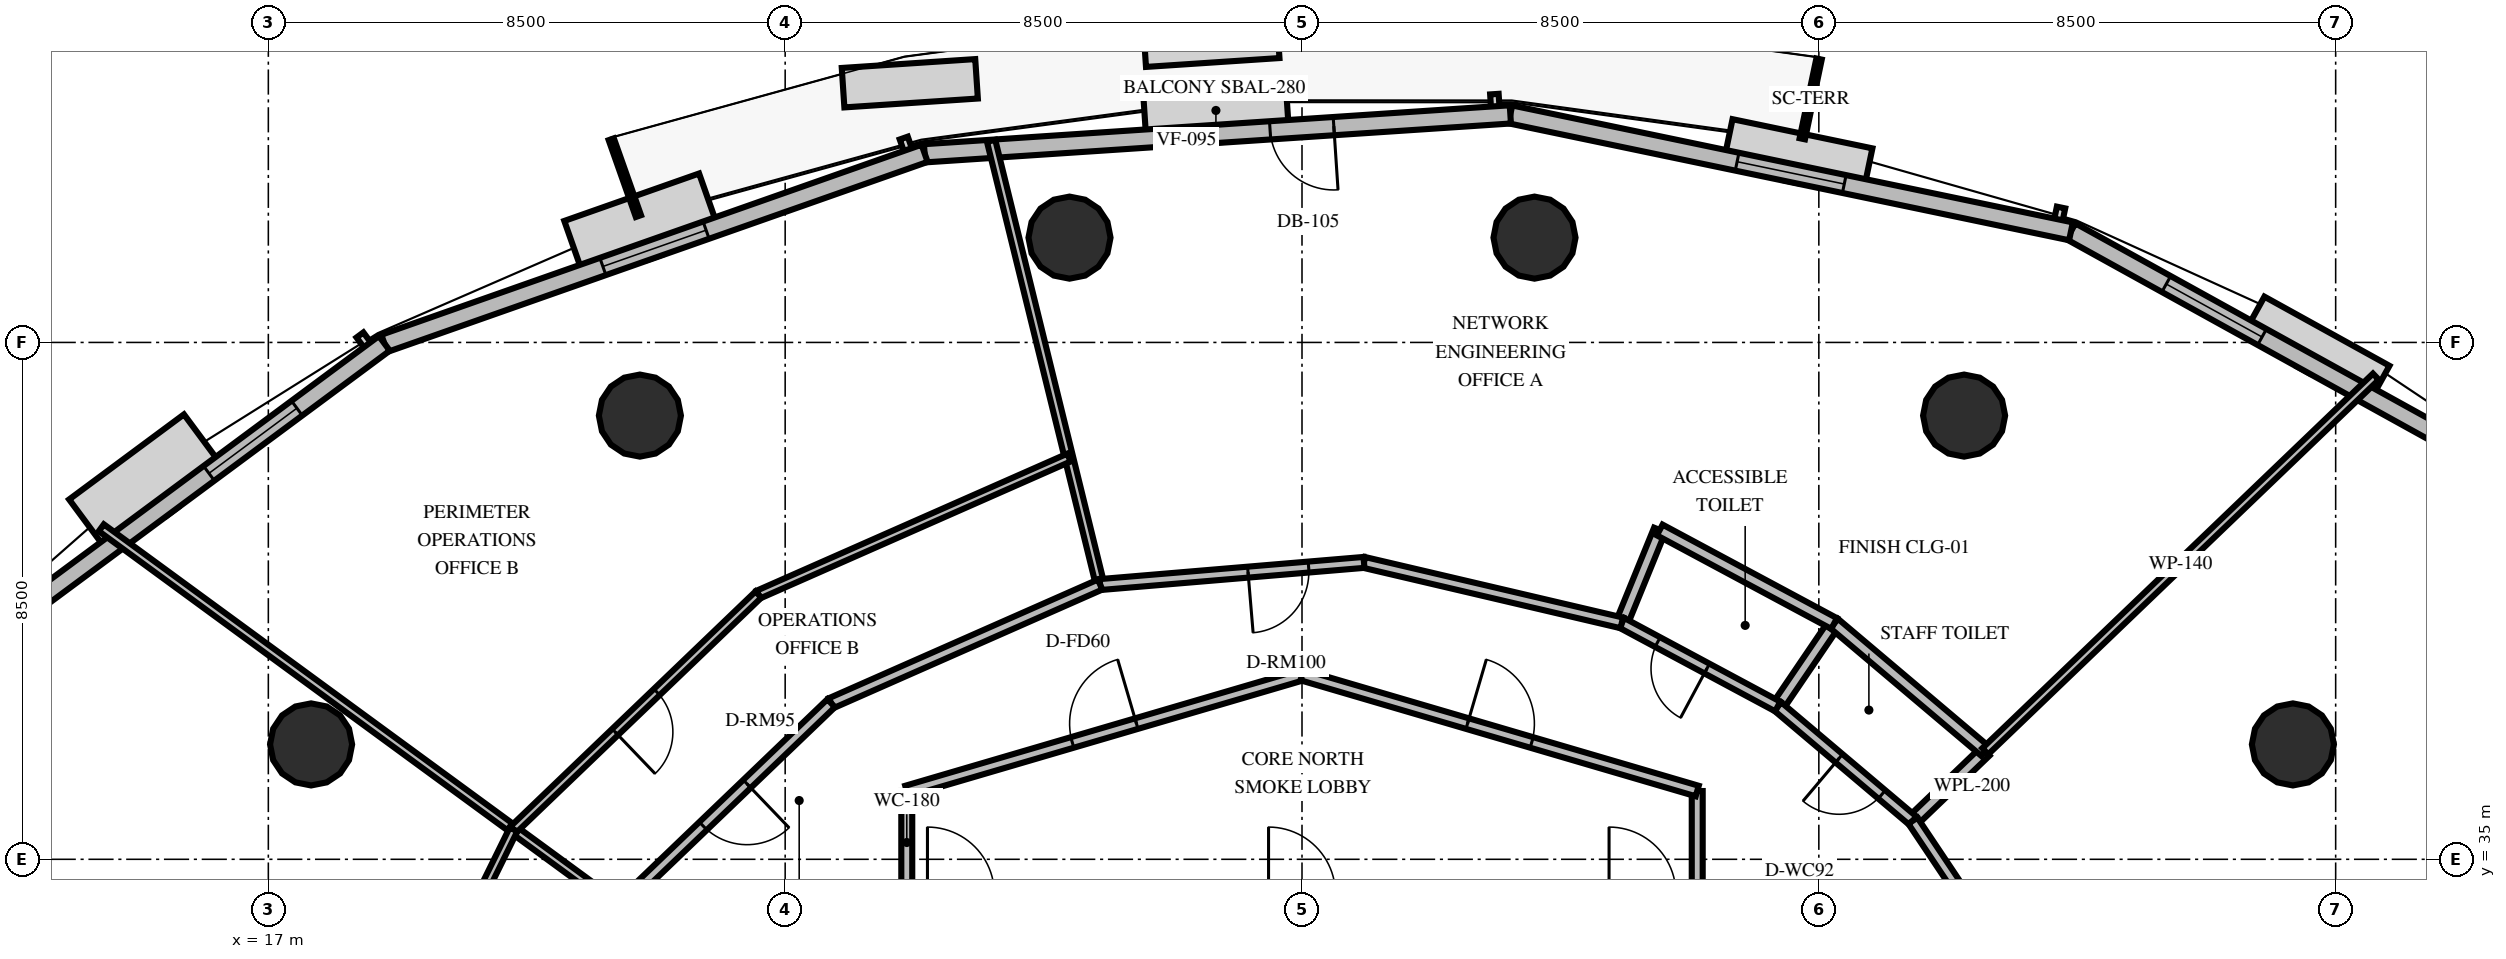
"""IFC4 building model, lengths in metres.
Left out: names, types, materials, properties, quantities, classifications, styles, units other than length and angle.
Written with IfcOpenShell. Run it as: python <this file> out.ifc"""

import sys

from ifc_helpers import new_model, si_unit, direction, frame, frame_2d, origin, origin_2d, place, context, subcontext, project, spatial, rectangle, circle, extrude, element, fill, save


model = new_model("IFC4")
c1 = context("Model", 3, precision=1e-05, world=origin(), true_north=direction((0.0, 1.0)))
c2 = subcontext(c1, "Body", "Model", "MODEL_VIEW")
j1 = project(units=[si_unit("LENGTHUNIT", "METRE"), si_unit("PLANEANGLEUNIT", "RADIAN")], contexts=[c1])
p1 = place(None, origin())
s1 = spatial("IfcSite", under=j1, at=p1, CompositionType="ELEMENT")
p2 = place(p1, origin())
s2 = spatial("IfcBuilding", under=s1, at=p2, CompositionType="ELEMENT")
p3 = place(p2, frame((0.0, 0.0, 46.8)))
s3 = spatial("IfcBuildingStorey", under=s2, at=p3, CompositionType="ELEMENT", Elevation=46.8)
for number, where, z_axis, x_axis in (
    (1, (50.297, 36.889, 0.0), (0.0, 0.0, 1.0), (1.0, 0.0, 0.0)),
    (2, (44.889, 42.297, 0.0), (0.0, 0.0, 1.0), (1.0, 0.0, 0.0)),
    (3, (37.824, 45.223, 0.0), (0.0, 0.0, 1.0), (1.0, 0.0, 0.0)),
    (4, (30.176, 45.223, 0.0), (0.0, 0.0, 1.0), (1.0, 0.0, 0.0)),
    (5, (23.111, 42.297, 0.0), (0.0, 0.0, 1.0), (1.0, 0.0, 0.0)),
    (6, (17.703, 36.889, 0.0), (0.0, 0.0, 1.0), (1.0, 0.0, 0.0)),
):
    element("IfcColumn", number, at=place(p3, frame(where, z_axis=z_axis, x_axis=x_axis)), inside=s3, PredefinedType="COLUMN", context=c2, shape_type="SweptSolid", body=[
        extrude(circle(Radius=0.675, at=origin_2d()), origin(), (0.0, 0.0, 1.0), 4.2),
    ])
p4 = place(p3, frame((54.342, 41.073, 0.0), z_axis=(0.0, 0.0, 1.0), x_axis=(-0.875145624266, 0.48385962461, 0.0)))
e7 = element("IfcWall", 7, at=p4, inside=s3, PredefinedType="SOLIDWALL", context=c2, shape_type="SweptSolid", body=[
    extrude(rectangle(XDim=8.793, YDim=0.3, at=frame_2d((4.396, 0.0))), origin(), (0.0, 0.0, 1.0), 3.0),
])
p5 = place(p4, frame((5.202, 0.0, 0.8)))
e8 = element("IfcOpeningElement", 8, at=p5, cuts=e7, PredefinedType="OPENING", context=c2, shape_type="SweptSolid", body=[
    extrude(rectangle(XDim=1.8, YDim=1.95, at=frame_2d((0.9, 0.975))), frame((0.0, 0.16, 0.0), z_axis=(0.0, -1.0, 0.0), x_axis=(1.0, 0.0, 0.0)), (0.0, 0.0, 1.0), 0.32),
])
p6 = place(p3, frame((46.647, 45.327, 0.0), z_axis=(0.0, 0.0, 1.0), x_axis=(-0.978929281729, 0.20419956262, 0.0)))
e9 = element("IfcWall", 9, at=p6, inside=s3, PredefinedType="SOLIDWALL", context=c2, shape_type="SweptSolid", body=[
    extrude(rectangle(XDim=9.419, YDim=0.3, at=frame_2d((4.709, 0.0))), origin(), (0.0, 0.0, 1.0), 3.0),
])
p7 = place(p6, frame((3.809, 0.0, 0.8)))
e10 = element("IfcOpeningElement", 10, at=p7, cuts=e9, PredefinedType="OPENING", context=c2, shape_type="SweptSolid", body=[
    extrude(rectangle(XDim=1.8, YDim=1.95, at=frame_2d((0.9, 0.975))), frame((0.0, 0.16, 0.0), z_axis=(0.0, -1.0, 0.0), x_axis=(1.0, 0.0, 0.0)), (0.0, 0.0, 1.0), 0.32),
])
p8 = place(p3, frame((37.427, 47.25, 0.0), z_axis=(0.0, 0.0, 1.0), x_axis=(-0.997801240682, -0.066277327145, 0.0)))
e11 = element("IfcWall", 11, at=p8, inside=s3, PredefinedType="SOLIDWALL", context=c2, shape_type="SweptSolid", body=[
    extrude(rectangle(XDim=9.655, YDim=0.3, at=frame_2d((4.827, 0.0))), origin(), (0.0, 0.0, 1.0), 3.0),
])
p9 = place(p8, frame((2.91, 0.0, 0.0)))
e12 = element("IfcOpeningElement", 12, at=p9, cuts=e11, PredefinedType="OPENING", context=c2, shape_type="SweptSolid", body=[
    extrude(rectangle(XDim=1.05, YDim=2.15, at=frame_2d((0.525, 1.075))), frame((0.0, 0.16, 0.0), z_axis=(0.0, -1.0, 0.0), x_axis=(1.0, 0.0, 0.0)), (0.0, 0.0, 1.0), 0.32),
])
p10 = place(p3, frame((27.793, 46.61, 0.0), z_axis=(0.0, 0.0, 1.0), x_axis=(-0.943328169931, -0.33186136234, 0.0)))
e13 = element("IfcWall", 13, at=p10, inside=s3, PredefinedType="SOLIDWALL", context=c2, shape_type="SweptSolid", body=[
    extrude(rectangle(XDim=9.419, YDim=0.3, at=frame_2d((4.709, 0.0))), origin(), (0.0, 0.0, 1.0), 3.0),
])
p11 = place(p10, frame((3.809, 0.0, 0.8)))
e14 = element("IfcOpeningElement", 14, at=p11, cuts=e13, PredefinedType="OPENING", context=c2, shape_type="SweptSolid", body=[
    extrude(rectangle(XDim=1.8, YDim=1.95, at=frame_2d((0.9, 0.975))), frame((0.0, 0.16, 0.0), z_axis=(0.0, -1.0, 0.0), x_axis=(1.0, 0.0, 0.0)), (0.0, 0.0, 1.0), 0.32),
])
p12 = place(p3, frame((18.908, 43.485, 0.0), z_axis=(0.0, 0.0, 1.0), x_axis=(-0.803465201032, -0.595351720187, 0.0)))
e15 = element("IfcWall", 15, at=p12, inside=s3, PredefinedType="SOLIDWALL", context=c2, shape_type="SweptSolid", body=[
    extrude(rectangle(XDim=8.792, YDim=0.3, at=frame_2d((4.396, 0.0))), origin(), (0.0, 0.0, 1.0), 3.0),
])
p13 = place(p12, frame((1.79, 0.0, 0.8)))
e16 = element("IfcOpeningElement", 16, at=p13, cuts=e15, PredefinedType="OPENING", context=c2, shape_type="SweptSolid", body=[
    extrude(rectangle(XDim=1.8, YDim=1.95, at=frame_2d((0.9, 0.975))), frame((0.0, 0.16, 0.0), z_axis=(0.0, -1.0, 0.0), x_axis=(1.0, 0.0, 0.0)), (0.0, 0.0, 1.0), 0.32),
])
for number, where, z_axis, x_axis in (
    (17, (27.5, 34.43, 0.0), (0.0, 0.0, 1.0), (0.0, 1.0, 0.0)),
    (18, (40.5, 36.123, 0.0), (0.0, 0.0, 1.0), (0.0, -1.0, 0.0)),
):
    element("IfcWall", number, at=place(p3, frame(where, z_axis=z_axis, x_axis=x_axis)), inside=s3, PredefinedType="PARTITIONING", context=c2, shape_type="SweptSolid", body=[
        extrude(rectangle(XDim=1.693, YDim=0.18, at=frame_2d((0.846, 0.0))), origin(), (0.0, 0.0, 1.0), 3.0),
    ])
p14 = place(p3, frame((27.5, 36.123, 0.0), z_axis=(0.0, 0.0, 1.0), x_axis=(0.959546654541, 0.281549671923, 0.0)))
e19 = element("IfcWall", 19, at=p14, inside=s3, PredefinedType="PARTITIONING", context=c2, shape_type="SweptSolid", body=[
    extrude(rectangle(XDim=6.774, YDim=0.18, at=frame_2d((3.387, 0.0))), origin(), (0.0, 0.0, 1.0), 3.0),
])
p15 = place(p14, frame((2.837, 0.0, 0.0)))
e20 = element("IfcOpeningElement", 20, at=p15, cuts=e19, PredefinedType="OPENING", context=c2, shape_type="SweptSolid", body=[
    extrude(rectangle(XDim=1.1, YDim=2.15, at=frame_2d((0.55, 1.075))), frame((0.0, 0.1, 0.0), z_axis=(0.0, -1.0, 0.0), x_axis=(1.0, 0.0, 0.0)), (0.0, 0.0, 1.0), 0.2),
])
p16 = place(p3, frame((34.0, 38.03, 0.0), z_axis=(0.0, 0.0, 1.0), x_axis=(0.959546654541, -0.281549671923, 0.0)))
e21 = element("IfcWall", 21, at=p16, inside=s3, PredefinedType="PARTITIONING", context=c2, shape_type="SweptSolid", body=[
    extrude(rectangle(XDim=6.774, YDim=0.18, at=frame_2d((3.387, 0.0))), origin(), (0.0, 0.0, 1.0), 3.0),
])
p17 = place(p16, frame((2.837, 0.0, 0.0)))
e22 = element("IfcOpeningElement", 22, at=p17, cuts=e21, PredefinedType="OPENING", context=c2, shape_type="SweptSolid", body=[
    extrude(rectangle(XDim=1.1, YDim=2.15, at=frame_2d((0.55, 1.075))), frame((0.0, 0.1, 0.0), z_axis=(0.0, -1.0, 0.0), x_axis=(1.0, 0.0, 0.0)), (0.0, 0.0, 1.0), 0.2),
])
for number, where, z_axis, x_axis in (
    (23, (44.047, 35.635, 0.0), (0.0, 0.0, 1.0), (0.722, 0.692, 0.0)),
    (24, (41.824, 37.513, 0.0), (0.0, 0.0, 1.0), (0.562, 0.827, 0.0)),
):
    element("IfcWall", number, at=place(p3, frame(where, z_axis=z_axis, x_axis=x_axis)), inside=s3, PredefinedType="PLUMBINGWALL", context=c2, shape_type="SweptSolid", body=[
        extrude(rectangle(XDim=1.65, YDim=0.2, at=frame_2d((0.825, 0.0))), origin(), (0.0, 0.0, 1.0), 3.0),
    ])
p18 = place(p3, frame((45.238, 36.777, 0.0), z_axis=(0.0, 0.0, 1.0), x_axis=(-0.76377022489, 0.645488221094, 0.0)))
e25 = element("IfcWall", 25, at=p18, inside=s3, PredefinedType="PLUMBINGWALL", context=c2, shape_type="SweptSolid", body=[
    extrude(rectangle(XDim=3.255, YDim=0.2, at=frame_2d((1.627, 0.0))), origin(), (0.0, 0.0, 1.0), 3.0),
])
p19 = place(p3, frame((44.047, 35.635, 0.0), z_axis=(0.0, 0.0, 1.0), x_axis=(-0.763774375934, 0.645483309363, 0.0)))
e26 = element("IfcWall", 26, at=p19, inside=s3, PredefinedType="PARTITIONING", context=c2, shape_type="SweptSolid", body=[
    extrude(rectangle(XDim=2.91, YDim=0.18, at=frame_2d((1.455, 0.0))), origin(), (0.0, 0.0, 1.0), 3.0),
])
p20 = place(p19, frame((0.669, 0.0, 0.0)))
e27 = element("IfcOpeningElement", 27, at=p20, cuts=e26, PredefinedType="OPENING", context=c2, shape_type="SweptSolid", body=[
    extrude(rectangle(XDim=0.92, YDim=2.1, at=frame_2d((0.46, 1.05))), frame((0.0, 0.1, 0.0), z_axis=(0.0, -1.0, 0.0), x_axis=(1.0, 0.0, 0.0)), (0.0, 0.0, 1.0), 0.2),
])
p21 = place(p3, frame((39.26, 38.888, 0.0), z_axis=(0.0, 0.0, 1.0), x_axis=(0.377912528559, 0.925841304305, 0.0)))
e28 = element("IfcWall", 28, at=p21, inside=s3, PredefinedType="PLUMBINGWALL", context=c2, shape_type="SweptSolid", body=[
    extrude(rectangle(XDim=1.65, YDim=0.2, at=frame_2d((0.825, 0.0))), origin(), (0.0, 0.0, 1.0), 3.0),
])
p22 = place(p3, frame((42.752, 38.878, 0.0), z_axis=(0.0, 0.0, 1.0), x_axis=(-0.881312658049, 0.47253359538, 0.0)))
e29 = element("IfcWall", 29, at=p22, inside=s3, PredefinedType="PLUMBINGWALL", context=c2, shape_type="SweptSolid", body=[
    extrude(rectangle(XDim=3.255, YDim=0.2, at=frame_2d((1.627, 0.0))), origin(), (0.0, 0.0, 1.0), 3.0),
])
p23 = place(p3, frame((41.824, 37.513, 0.0), z_axis=(0.0, 0.0, 1.0), x_axis=(-0.881294073776, 0.472568254887, 0.0)))
e30 = element("IfcWall", 30, at=p23, inside=s3, PredefinedType="PARTITIONING", context=c2, shape_type="SweptSolid", body=[
    extrude(rectangle(XDim=2.91, YDim=0.18, at=frame_2d((1.455, 0.0))), origin(), (0.0, 0.0, 1.0), 3.0),
])
p24 = place(p23, frame((1.321, 0.0, 0.0)))
e31 = element("IfcOpeningElement", 31, at=p24, cuts=e30, PredefinedType="OPENING", context=c2, shape_type="SweptSolid", body=[
    extrude(rectangle(XDim=0.92, YDim=2.1, at=frame_2d((0.46, 1.05))), frame((0.0, 0.1, 0.0), z_axis=(0.0, -1.0, 0.0), x_axis=(1.0, 0.0, 0.0)), (0.0, 0.0, 1.0), 0.2),
])
p25 = place(p3, frame((45.238, 36.777, 0.0), z_axis=(0.0, 0.0, 1.0), x_axis=(0.721750646937, 0.692153164874, 0.0)))
e32 = element("IfcWall", 32, at=p25, inside=s3, PredefinedType="PARTITIONING", context=c2, shape_type="SweptSolid", body=[
    extrude(rectangle(XDim=8.9, YDim=0.14, at=frame_2d((4.45, 0.0))), origin(), (0.0, 0.0, 1.0), 3.0),
])
p26 = place(p3, frame((30.68, 39.518, 0.0), z_axis=(0.0, 0.0, 1.0), x_axis=(-0.238558066821, 0.971128234969, 0.0)))
e33 = element("IfcWall", 33, at=p26, inside=s3, PredefinedType="PARTITIONING", context=c2, shape_type="SweptSolid", body=[
    extrude(rectangle(XDim=7.514, YDim=0.14, at=frame_2d((3.757, 0.0))), origin(), (0.0, 0.0, 1.0), 3.0),
])
p27 = place(p3, frame((39.26, 38.888, 0.0), z_axis=(0.0, 0.0, 1.0), x_axis=(-0.973583801544, 0.228329983514, 0.0)))
e34 = element("IfcWall", 34, at=p27, inside=s3, PredefinedType="PARTITIONING", context=c2, shape_type="SweptSolid", body=[
    extrude(rectangle(XDim=4.355, YDim=0.18, at=frame_2d((2.177, 0.0))), origin(), (0.0, 0.0, 1.0), 3.0),
])
p28 = place(p3, frame((35.02, 39.883, 0.0), z_axis=(0.0, 0.0, 1.0), x_axis=(-0.99649609518, -0.083639298718, 0.0)))
e35 = element("IfcWall", 35, at=p28, inside=s3, PredefinedType="PARTITIONING", context=c2, shape_type="SweptSolid", body=[
    extrude(rectangle(XDim=4.355, YDim=0.18, at=frame_2d((2.178, 0.0))), origin(), (0.0, 0.0, 1.0), 3.0),
])
p29 = place(p28, frame((0.914, 0.0, 0.0)))
e36 = element("IfcOpeningElement", 36, at=p29, cuts=e35, PredefinedType="OPENING", context=c2, shape_type="SweptSolid", body=[
    extrude(rectangle(XDim=1.0, YDim=2.15, at=frame_2d((0.5, 1.075))), frame((0.0, 0.1, 0.0), z_axis=(0.0, -1.0, 0.0), x_axis=(1.0, 0.0, 0.0)), (0.0, 0.0, 1.0), 0.2),
])
p30 = place(p3, frame((22.767, 34.221, 0.0), z_axis=(0.0, 0.0, 1.0), x_axis=(-0.806954200192, 0.590614018453, 0.0)))
e37 = element("IfcWall", 37, at=p30, inside=s3, PredefinedType="PARTITIONING", context=c2, shape_type="SweptSolid", body=[
    extrude(rectangle(XDim=10.55, YDim=0.14, at=frame_2d((5.275, 0.0))), origin(), (0.0, 0.0, 1.0), 3.0),
])
p31 = place(p3, frame((30.68, 39.518, 0.0), z_axis=(0.0, 0.0, 1.0), x_axis=(-0.914959483899, -0.403545713425, 0.0)))
e38 = element("IfcWall", 38, at=p31, inside=s3, PredefinedType="PARTITIONING", context=c2, shape_type="SweptSolid", body=[
    extrude(rectangle(XDim=4.834, YDim=0.18, at=frame_2d((2.417, 0.0))), origin(), (0.0, 0.0, 1.0), 3.0),
])
p32 = place(p3, frame((26.256, 37.567, 0.0), z_axis=(0.0, 0.0, 1.0), x_axis=(-0.721748503055, -0.692155400425, 0.0)))
e39 = element("IfcWall", 39, at=p32, inside=s3, PredefinedType="PARTITIONING", context=c2, shape_type="SweptSolid", body=[
    extrude(rectangle(XDim=4.834, YDim=0.18, at=frame_2d((2.417, 0.0))), origin(), (0.0, 0.0, 1.0), 3.0),
])
p33 = place(p32, frame((1.917, 0.0, 0.0)))
e40 = element("IfcOpeningElement", 40, at=p33, cuts=e39, PredefinedType="OPENING", context=c2, shape_type="SweptSolid", body=[
    extrude(rectangle(XDim=1.0, YDim=2.15, at=frame_2d((0.5, 1.075))), frame((0.0, 0.1, 0.0), z_axis=(0.0, -1.0, 0.0), x_axis=(1.0, 0.0, 0.0)), (0.0, 0.0, 1.0), 0.2),
])
p34 = place(p3, frame((30.167, 41.606, 0.0), z_axis=(0.0, 0.0, 1.0), x_axis=(-0.914960559012, -0.403543275812, 0.0)))
e41 = element("IfcWall", 41, at=p34, inside=s3, PredefinedType="PARTITIONING", context=c2, shape_type="SweptSolid", body=[
    extrude(rectangle(XDim=5.581, YDim=0.14, at=frame_2d((2.791, 0.0))), origin(), (0.0, 0.0, 1.0), 3.0),
])
p35 = place(p3, frame((25.06, 39.354, 0.0), z_axis=(0.0, 0.0, 1.0), x_axis=(-0.721758722744, -0.692144743636, 0.0)))
e42 = element("IfcWall", 42, at=p35, inside=s3, PredefinedType="PARTITIONING", context=c2, shape_type="SweptSolid", body=[
    extrude(rectangle(XDim=5.581, YDim=0.14, at=frame_2d((2.791, 0.0))), origin(), (0.0, 0.0, 1.0), 3.0),
])
p36 = place(p35, frame((2.315, 0.0, 0.0)))
e43 = element("IfcOpeningElement", 43, at=p36, cuts=e42, PredefinedType="OPENING", context=c2, shape_type="SweptSolid", body=[
    extrude(rectangle(XDim=0.95, YDim=2.15, at=frame_2d((0.475, 1.075))), frame((0.0, 0.08, 0.0), z_axis=(0.0, -1.0, 0.0), x_axis=(1.0, 0.0, 0.0)), (0.0, 0.0, 1.0), 0.16),
])
p37 = place(p3, frame((21.032, 35.491, 0.0), z_axis=(0.0, 0.0, 1.0), x_axis=(-0.441482494999, -0.897269862756, 0.0)))
e44 = element("IfcWall", 44, at=p37, inside=s3, PredefinedType="PARTITIONING", context=c2, shape_type="SweptSolid", body=[
    extrude(rectangle(XDim=5.581, YDim=0.14, at=frame_2d((2.791, 0.0))), origin(), (0.0, 0.0, 1.0), 3.0),
])
p38 = place(p37, frame((3.383, 0.0, 0.0)))
e45 = element("IfcOpeningElement", 45, at=p38, cuts=e44, PredefinedType="OPENING", context=c2, shape_type="SweptSolid", body=[
    extrude(rectangle(XDim=0.95, YDim=2.15, at=frame_2d((0.475, 1.075))), frame((0.0, 0.08, 0.0), z_axis=(0.0, -1.0, 0.0), x_axis=(1.0, 0.0, 0.0)), (0.0, 0.0, 1.0), 0.16),
])
p39 = place(p3, frame((46.736, 31.617, 0.0), z_axis=(0.0, 0.0, 1.0), x_axis=(-0.556295861918, 0.830984304312, 0.0)))
e46 = element("IfcWall", 46, at=p39, inside=s3, PredefinedType="PARTITIONING", context=c2, shape_type="SweptSolid", body=[
    extrude(rectangle(XDim=4.834, YDim=0.18, at=frame_2d((2.417, 0.0))), origin(), (0.0, 0.0, 1.0), 3.0),
])
p40 = place(p5, origin())
e47 = element("IfcWindow", 47, at=p40, inside=s3, PartitioningType="SINGLE_PANEL", PredefinedType="WINDOW", context=c2, shape_type="SweptSolid", body=[
    extrude(rectangle(XDim=1.8, YDim=1.95, at=frame_2d((0.9, 0.975))), frame((0.0, 0.03, 0.0), z_axis=(0.0, -1.0, 0.0), x_axis=(1.0, 0.0, 0.0)), (0.0, 0.0, 1.0), 0.06),
])
fill(e8, e47)
p41 = place(p7, origin())
e48 = element("IfcWindow", 48, at=p41, inside=s3, PartitioningType="SINGLE_PANEL", PredefinedType="WINDOW", context=c2, shape_type="SweptSolid", body=[
    extrude(rectangle(XDim=1.8, YDim=1.95, at=frame_2d((0.9, 0.975))), frame((0.0, 0.03, 0.0), z_axis=(0.0, -1.0, 0.0), x_axis=(1.0, 0.0, 0.0)), (0.0, 0.0, 1.0), 0.06),
])
fill(e10, e48)
p42 = place(p9, origin())
e49 = element("IfcDoor", 49, at=p42, inside=s3, OperationType="SINGLE_SWING_LEFT", PredefinedType="DOOR", context=c2, shape_type="SweptSolid", body=[
    extrude(rectangle(XDim=1.05, YDim=2.15, at=frame_2d((0.525, 1.075))), frame((0.0, 0.025, 0.0), z_axis=(0.0, -1.0, 0.0), x_axis=(1.0, 0.0, 0.0)), (0.0, 0.0, 1.0), 0.05),
])
fill(e12, e49)
p43 = place(p11, origin())
e50 = element("IfcWindow", 50, at=p43, inside=s3, PartitioningType="SINGLE_PANEL", PredefinedType="WINDOW", context=c2, shape_type="SweptSolid", body=[
    extrude(rectangle(XDim=1.8, YDim=1.95, at=frame_2d((0.9, 0.975))), frame((0.0, 0.03, 0.0), z_axis=(0.0, -1.0, 0.0), x_axis=(1.0, 0.0, 0.0)), (0.0, 0.0, 1.0), 0.06),
])
fill(e14, e50)
p44 = place(p13, origin())
e51 = element("IfcWindow", 51, at=p44, inside=s3, PartitioningType="SINGLE_PANEL", PredefinedType="WINDOW", context=c2, shape_type="SweptSolid", body=[
    extrude(rectangle(XDim=1.8, YDim=1.95, at=frame_2d((0.9, 0.975))), frame((0.0, 0.03, 0.0), z_axis=(0.0, -1.0, 0.0), x_axis=(1.0, 0.0, 0.0)), (0.0, 0.0, 1.0), 0.06),
])
fill(e16, e51)
p45 = place(p15, origin())
e52 = element("IfcDoor", 52, at=p45, inside=s3, OperationType="SINGLE_SWING_RIGHT", PredefinedType="DOOR", context=c2, shape_type="SweptSolid", body=[
    extrude(rectangle(XDim=1.1, YDim=2.15, at=frame_2d((0.55, 1.075))), frame((0.0, 0.025, 0.0), z_axis=(0.0, -1.0, 0.0), x_axis=(1.0, 0.0, 0.0)), (0.0, 0.0, 1.0), 0.05),
])
fill(e20, e52)
p46 = place(p17, origin())
e53 = element("IfcDoor", 53, at=p46, inside=s3, OperationType="SINGLE_SWING_LEFT", PredefinedType="DOOR", context=c2, shape_type="SweptSolid", body=[
    extrude(rectangle(XDim=1.1, YDim=2.15, at=frame_2d((0.55, 1.075))), frame((0.0, 0.025, 0.0), z_axis=(0.0, -1.0, 0.0), x_axis=(1.0, 0.0, 0.0)), (0.0, 0.0, 1.0), 0.05),
])
fill(e22, e53)
p47 = place(p20, origin())
e54 = element("IfcDoor", 54, at=p47, inside=s3, OperationType="SINGLE_SWING_RIGHT", PredefinedType="DOOR", context=c2, shape_type="SweptSolid", body=[
    extrude(rectangle(XDim=0.92, YDim=2.1, at=frame_2d((0.46, 1.05))), frame((0.0, 0.025, 0.0), z_axis=(0.0, -1.0, 0.0), x_axis=(1.0, 0.0, 0.0)), (0.0, 0.0, 1.0), 0.05),
])
fill(e27, e54)
p48 = place(p24, origin())
e55 = element("IfcDoor", 55, at=p48, inside=s3, OperationType="SINGLE_SWING_LEFT", PredefinedType="DOOR", context=c2, shape_type="SweptSolid", body=[
    extrude(rectangle(XDim=0.92, YDim=2.1, at=frame_2d((0.46, 1.05))), frame((0.0, 0.025, 0.0), z_axis=(0.0, -1.0, 0.0), x_axis=(1.0, 0.0, 0.0)), (0.0, 0.0, 1.0), 0.05),
])
fill(e31, e55)
p49 = place(p29, origin())
e56 = element("IfcDoor", 56, at=p49, inside=s3, OperationType="SINGLE_SWING_RIGHT", PredefinedType="DOOR", context=c2, shape_type="SweptSolid", body=[
    extrude(rectangle(XDim=1.0, YDim=2.15, at=frame_2d((0.5, 1.075))), frame((0.0, 0.025, 0.0), z_axis=(0.0, -1.0, 0.0), x_axis=(1.0, 0.0, 0.0)), (0.0, 0.0, 1.0), 0.05),
])
fill(e36, e56)
p50 = place(p33, origin())
e57 = element("IfcDoor", 57, at=p50, inside=s3, OperationType="SINGLE_SWING_LEFT", PredefinedType="DOOR", context=c2, shape_type="SweptSolid", body=[
    extrude(rectangle(XDim=1.0, YDim=2.15, at=frame_2d((0.5, 1.075))), frame((0.0, 0.025, 0.0), z_axis=(0.0, -1.0, 0.0), x_axis=(1.0, 0.0, 0.0)), (0.0, 0.0, 1.0), 0.05),
])
fill(e40, e57)
p51 = place(p36, origin())
e58 = element("IfcDoor", 58, at=p51, inside=s3, OperationType="SINGLE_SWING_RIGHT", PredefinedType="DOOR", context=c2, shape_type="SweptSolid", body=[
    extrude(rectangle(XDim=0.95, YDim=2.15, at=frame_2d((0.475, 1.075))), frame((0.0, 0.025, 0.0), z_axis=(0.0, -1.0, 0.0), x_axis=(1.0, 0.0, 0.0)), (0.0, 0.0, 1.0), 0.05),
])
fill(e43, e58)
save(model, sys.argv[1])
